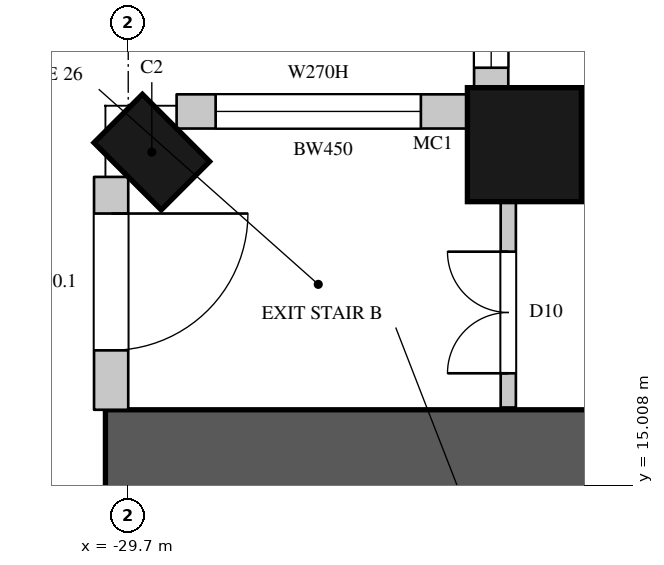
"""IFC4 building model, lengths in metres.
Left out: names, types, materials, properties, quantities, classifications, styles, units other than length and angle.
Written with IfcOpenShell. Run it as: python <this file> out.ifc"""

import sys

from ifc_helpers import new_model, si_unit, direction, frame, frame_2d, origin, origin_2d, place, context, subcontext, project, spatial, rectangle, circle, extrude, element, fill, save


model = new_model("IFC4")
c1 = context("Model", 3, precision=1e-05, world=origin(), true_north=direction((0.0, 1.0)))
c2 = subcontext(c1, "Body", "Model", "MODEL_VIEW")
j1 = project(units=[si_unit("LENGTHUNIT", "METRE"), si_unit("PLANEANGLEUNIT", "RADIAN")], contexts=[c1])
p1 = place(None, origin())
s1 = spatial("IfcSite", under=j1, at=p1, CompositionType="ELEMENT")
p2 = place(p1, origin())
s2 = spatial("IfcBuilding", under=s1, at=p2, CompositionType="ELEMENT")
p3 = place(p2, frame((0.0, 0.0, 123.9)))
s3 = spatial("IfcBuildingStorey", under=s2, at=p3, CompositionType="ELEMENT", Elevation=123.9)
p4 = place(p3, frame((-29.39, 19.39, 0.0), z_axis=(0.0, 0.0, 1.0), x_axis=(-0.707106781187, -0.707106781187, 0.0)))
e1 = element("IfcColumn", 1, at=p4, inside=s3, PredefinedType="COLUMN", context=c2, shape_type="SweptSolid", body=[
    extrude(rectangle(XDim=0.9, YDim=1.25, at=origin_2d()), origin(), (0.0, 0.0, 1.0), 3.6),
])
p5 = place(p3, frame((-24.488, 19.488, 0.0), z_axis=(0.0, 0.0, 1.0), x_axis=(1.0, 0.0, 0.0)))
e2 = element("IfcColumn", 2, at=p5, inside=s3, PredefinedType="COLUMN", context=c2, shape_type="SweptSolid", body=[
    extrude(circle(Radius=0.75, at=origin_2d()), origin(), (0.0, 0.0, 1.0), 3.6),
])
p6 = place(p3, frame((-29.925, 19.064, 0.0), z_axis=(0.0, 0.0, 1.0), x_axis=(0.0, -1.0, 0.0)))
e3 = element("IfcWall", 3, at=p6, inside=s3, PredefinedType="SOLIDWALL", context=c2, shape_type="SweptSolid", body=[
    extrude(rectangle(XDim=3.064, YDim=0.45, at=frame_2d((1.532, 0.0))), origin(), (0.0, 0.0, 1.0), 3.3),
])
p7 = place(p6, frame((0.482, 0.0, 0.0)))
e4 = element("IfcOpeningElement", 4, at=p7, cuts=e3, PredefinedType="OPENING", context=c2, shape_type="SweptSolid", body=[
    extrude(rectangle(XDim=1.8, YDim=2.4, at=frame_2d((0.9, 1.2))), frame((0.0, 0.235, 0.0), z_axis=(0.0, -1.0, 0.0), x_axis=(1.0, 0.0, 0.0)), (0.0, 0.0, 1.0), 0.47),
])
p8 = place(p3, frame((-24.925, 22.05, 0.0), z_axis=(0.0, 0.0, 1.0), x_axis=(0.0, -1.0, 0.0)))
e5 = element("IfcWall", 5, at=p8, inside=s3, PredefinedType="SOLIDWALL", context=c2, shape_type="SweptSolid", body=[
    extrude(rectangle(XDim=1.843, YDim=0.45, at=frame_2d((0.921, 0.0))), origin(), (0.0, 0.0, 1.0), 3.3),
])
p9 = place(p8, frame((0.35, 0.0, 1.05)))
e6 = element("IfcOpeningElement", 6, at=p9, cuts=e5, PredefinedType="OPENING", context=c2, shape_type="SweptSolid", body=[
    extrude(rectangle(XDim=1.2, YDim=2.0, at=frame_2d((0.6, 1.0))), frame((0.0, 0.235, 0.0), z_axis=(0.0, -1.0, 0.0), x_axis=(1.0, 0.0, 0.0)), (0.0, 0.0, 1.0), 0.47),
])
p10 = place(p3, frame((-25.207, 19.925, 0.0), z_axis=(0.0, 0.0, 1.0), x_axis=(-1.0, 0.0, 0.0)))
e7 = element("IfcWall", 7, at=p10, inside=s3, PredefinedType="SOLIDWALL", context=c2, shape_type="SweptSolid", body=[
    extrude(rectangle(XDim=3.857, YDim=0.45, at=frame_2d((1.928, 0.0))), origin(), (0.0, 0.0, 1.0), 3.3),
])
p11 = place(p10, frame((0.643, 0.0, 1.05)))
e8 = element("IfcOpeningElement", 8, at=p11, cuts=e7, PredefinedType="OPENING", context=c2, shape_type="SweptSolid", body=[
    extrude(rectangle(XDim=2.7, YDim=2.0, at=frame_2d((1.35, 1.0))), frame((0.0, 0.235, 0.0), z_axis=(0.0, -1.0, 0.0), x_axis=(1.0, 0.0, 0.0)), (0.0, 0.0, 1.0), 0.47),
])
p12 = place(p3, frame((-30.0, 15.4, 0.0), z_axis=(0.0, 0.0, 1.0), x_axis=(1.0, 0.0, 0.0)))
e9 = element("IfcWall", 9, at=p12, inside=s3, PredefinedType="SHEAR", context=c2, shape_type="SweptSolid", body=[
    extrude(rectangle(XDim=16.0, YDim=1.2, at=frame_2d((8.0, 0.0))), origin(), (0.0, 0.0, 1.0), 3.6),
])
p13 = place(p12, frame((13.4, 0.0, 0.0)))
e10 = element("IfcOpeningElement", 10, at=p13, cuts=e9, PredefinedType="OPENING", context=c2, shape_type="SweptSolid", body=[
    extrude(rectangle(XDim=1.5, YDim=2.4, at=frame_2d((0.75, 1.2))), frame((0.0, 0.61, 0.0), z_axis=(0.0, -1.0, 0.0), x_axis=(1.0, 0.0, 0.0)), (0.0, 0.0, 1.0), 1.22),
])
p14 = place(p3, frame((-24.7, 16.03, 0.0), z_axis=(0.0, 0.0, 1.0), x_axis=(0.0, 1.0, 0.0)))
e11 = element("IfcWall", 11, at=p14, inside=s3, PredefinedType="PARTITIONING", context=c2, shape_type="SweptSolid", body=[
    extrude(rectangle(XDim=2.722, YDim=0.2, at=frame_2d((1.361, 0.0))), origin(), (0.0, 0.0, 1.0), 3.3),
])
p15 = place(p14, frame((0.45, 0.0, 0.0)))
e12 = element("IfcOpeningElement", 12, at=p15, cuts=e11, PredefinedType="OPENING", context=c2, shape_type="SweptSolid", body=[
    extrude(rectangle(XDim=1.6, YDim=2.4, at=frame_2d((0.8, 1.2))), frame((0.0, 0.11, 0.0), z_axis=(0.0, -1.0, 0.0), x_axis=(1.0, 0.0, 0.0)), (0.0, 0.0, 1.0), 0.22),
])
p16 = place(p3, frame((-23.752, 19.7, 0.0), z_axis=(0.0, 0.0, 1.0), x_axis=(1.0, 0.0, 0.0)))
e13 = element("IfcWall", 13, at=p16, inside=s3, PredefinedType="PARTITIONING", context=c2, shape_type="SweptSolid", body=[
    extrude(rectangle(XDim=3.152, YDim=0.2, at=frame_2d((1.576, 0.0))), origin(), (0.0, 0.0, 1.0), 3.3),
])
p17 = place(p16, frame((1.9, 0.0, 0.0)))
e14 = element("IfcOpeningElement", 14, at=p17, cuts=e13, PredefinedType="OPENING", context=c2, shape_type="SweptSolid", body=[
    extrude(rectangle(XDim=0.95, YDim=2.2, at=frame_2d((0.475, 1.1))), frame((0.0, 0.11, 0.0), z_axis=(0.0, -1.0, 0.0), x_axis=(1.0, 0.0, 0.0)), (0.0, 0.0, 1.0), 0.22),
])
p18 = place(p7, origin())
e15 = element("IfcDoor", 15, at=p18, inside=s3, OperationType="SLIDING_TO_LEFT", PredefinedType="DOOR", context=c2, shape_type="SweptSolid", body=[
    extrude(rectangle(XDim=1.8, YDim=2.4, at=frame_2d((0.9, 1.2))), frame((0.0, 0.13, 0.0), z_axis=(0.0, -1.0, 0.0), x_axis=(1.0, 0.0, 0.0)), (0.0, 0.0, 1.0), 0.05),
])
fill(e4, e15)
p19 = place(p9, origin())
e16 = element("IfcWindow", 16, at=p19, inside=s3, PartitioningType="SINGLE_PANEL", PredefinedType="WINDOW", context=c2, shape_type="SweptSolid", body=[
    extrude(rectangle(XDim=1.2, YDim=2.0, at=frame_2d((0.6, 1.0))), frame((0.0, 0.135, 0.0), z_axis=(0.0, -1.0, 0.0), x_axis=(1.0, 0.0, 0.0)), (0.0, 0.0, 1.0), 0.06),
])
fill(e6, e16)
p20 = place(p11, origin())
e17 = element("IfcWindow", 17, at=p20, inside=s3, PartitioningType="SINGLE_PANEL", PredefinedType="WINDOW", context=c2, shape_type="SweptSolid", body=[
    extrude(rectangle(XDim=2.7, YDim=2.0, at=frame_2d((1.35, 1.0))), frame((0.0, 0.135, 0.0), z_axis=(0.0, -1.0, 0.0), x_axis=(1.0, 0.0, 0.0)), (0.0, 0.0, 1.0), 0.06),
])
fill(e8, e17)
p21 = place(p15, origin())
e18 = element("IfcDoor", 18, at=p21, inside=s3, OperationType="DOUBLE_DOOR_SINGLE_SWING", PredefinedType="DOOR", context=c2, shape_type="SweptSolid", body=[
    extrude(rectangle(XDim=1.6, YDim=2.4, at=frame_2d((0.8, 1.2))), frame((0.0, 0.025, 0.0), z_axis=(0.0, -1.0, 0.0), x_axis=(1.0, 0.0, 0.0)), (0.0, 0.0, 1.0), 0.05),
])
fill(e12, e18)
save(model, sys.argv[1])
